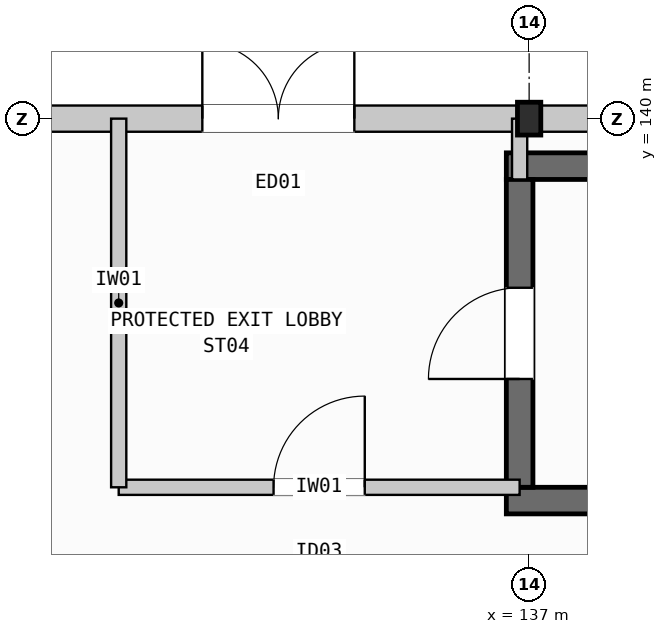
"""IFC4 building model, lengths in metres.
Left out: names, types, materials, properties, quantities, classifications, styles, units other than length and angle.
Written with IfcOpenShell. Run it as: python <this file> out.ifc"""

import sys

from ifc_helpers import new_model, si_unit, direction, frame, frame_2d, origin, origin_2d, place, context, subcontext, project, spatial, rectangle, i_section, extrude, element, fill, save


model = new_model("IFC4")
c1 = context("Model", 3, precision=1e-05, world=origin(), true_north=direction((0.0, 1.0)))
c2 = subcontext(c1, "Body", "Model", "MODEL_VIEW")
j1 = project(units=[si_unit("LENGTHUNIT", "METRE"), si_unit("PLANEANGLEUNIT", "RADIAN")], contexts=[c1])
p1 = place(None, origin())
s1 = spatial("IfcSite", under=j1, at=p1, CompositionType="ELEMENT")
p2 = place(p1, origin())
s2 = spatial("IfcBuilding", under=s1, at=p2, CompositionType="ELEMENT")
p3 = place(p2, origin())
s3 = spatial("IfcBuildingStorey", under=s2, at=p3, CompositionType="ELEMENT", Elevation=0.0)
p4 = place(p3, frame((137.0, 140.0, 0.0), z_axis=(0.0, 0.0, 1.0), x_axis=(1.0, 0.0, 0.0)))
e1 = element("IfcColumn", 1, at=p4, inside=s3, PredefinedType="COLUMN", context=c2, shape_type="SweptSolid", body=[
    extrude(i_section(OverallWidth=0.307, OverallDepth=0.432, WebThickness=0.021, FlangeThickness=0.04, FilletRadius=0.027, at=origin_2d()), origin(), (0.0, 0.0, 1.0), 6.0),
])
for number, where, z_axis, x_axis in (
    (2, (136.7, 134.975, 0.0), (0.0, 0.0, 1.0), (1.0, 0.0, 0.0)),
    (3, (136.7, 139.375, 0.0), (0.0, 0.0, 1.0), (1.0, 0.0, 0.0)),
):
    element("IfcWall", number, at=place(p3, frame(where, z_axis=z_axis, x_axis=x_axis)), inside=s3, PredefinedType="SHEAR", context=c2, shape_type="SweptSolid", body=[
        extrude(rectangle(XDim=9.1, YDim=0.35, at=frame_2d((4.55, 0.0))), origin(), (0.0, 0.0, 1.0), 6.0),
    ])
p5 = place(p3, frame((136.875, 135.15, 0.0), z_axis=(0.0, 0.0, 1.0), x_axis=(0.0, 1.0, 0.0)))
e4 = element("IfcWall", 4, at=p5, inside=s3, PredefinedType="SHEAR", context=c2, shape_type="SweptSolid", body=[
    extrude(rectangle(XDim=4.05, YDim=0.35, at=frame_2d((2.025, 0.0))), origin(), (0.0, 0.0, 1.0), 6.0),
])
p6 = place(p5, frame((1.425, 0.0, 0.0)))
e5 = element("IfcOpeningElement", 5, at=p6, cuts=e4, PredefinedType="OPENING", context=c2, shape_type="SweptSolid", body=[
    extrude(rectangle(XDim=1.2, YDim=2.2, at=frame_2d((0.6, 1.1))), frame((0.0, 0.185, 0.0), z_axis=(0.0, -1.0, 0.0), x_axis=(1.0, 0.0, 0.0)), (0.0, 0.0, 1.0), 0.37),
])
p7 = place(p3, frame((128.149, 140.0, 0.0), z_axis=(0.0, 0.0, 1.0), x_axis=(1.0, 0.0, 0.0)))
e6 = element("IfcWall", 6, at=p7, inside=s3, PredefinedType="STANDARD", context=c2, shape_type="SweptSolid", body=[
    extrude(rectangle(XDim=8.701, YDim=0.345, at=frame_2d((4.351, 0.0))), origin(), (0.0, 0.0, 1.0), 4.22),
])
p8 = place(p7, frame((4.551, 0.0, 0.0)))
e7 = element("IfcOpeningElement", 7, at=p8, cuts=e6, PredefinedType="OPENING", context=c2, shape_type="SweptSolid", body=[
    extrude(rectangle(XDim=2.0, YDim=2.3, at=frame_2d((1.0, 1.15))), frame((0.0, 0.183, 0.0), z_axis=(0.0, -1.0, 0.0), x_axis=(1.0, 0.0, 0.0)), (0.0, 0.0, 1.0), 0.365),
])
p9 = place(p3, frame((137.149, 140.0, 0.0), z_axis=(0.0, 0.0, 1.0), x_axis=(1.0, 0.0, 0.0)))
e8 = element("IfcWall", 8, at=p9, inside=s3, PredefinedType="STANDARD", context=c2, shape_type="SweptSolid", body=[
    extrude(rectangle(XDim=8.701, YDim=0.345, at=frame_2d((4.351, 0.0))), origin(), (0.0, 0.0, 1.0), 4.958),
])
p10 = place(p3, frame((131.6, 135.15, 0.0), z_axis=(0.0, 0.0, 1.0), x_axis=(1.0, 0.0, 0.0)))
e9 = element("IfcWall", 9, at=p10, inside=s3, PredefinedType="PARTITIONING", context=c2, shape_type="SweptSolid", body=[
    extrude(rectangle(XDim=5.275, YDim=0.2, at=frame_2d((2.637, 0.0))), origin(), (0.0, 0.0, 1.0), 4.2),
])
p11 = place(p10, frame((2.038, 0.0, 0.0)))
e10 = element("IfcOpeningElement", 10, at=p11, cuts=e9, PredefinedType="OPENING", context=c2, shape_type="SweptSolid", body=[
    extrude(rectangle(XDim=1.2, YDim=2.2, at=frame_2d((0.6, 1.1))), frame((0.0, 0.11, 0.0), z_axis=(0.0, -1.0, 0.0), x_axis=(1.0, 0.0, 0.0)), (0.0, 0.0, 1.0), 0.22),
])
p12 = place(p3, frame((131.6, 135.15, 0.0), z_axis=(0.0, 0.0, 1.0), x_axis=(0.0, 1.0, 0.0)))
e11 = element("IfcWall", 11, at=p12, inside=s3, PredefinedType="PARTITIONING", context=c2, shape_type="SweptSolid", body=[
    extrude(rectangle(XDim=4.85, YDim=0.2, at=frame_2d((2.425, 0.0))), origin(), (0.0, 0.0, 1.0), 4.2),
])
p13 = place(p3, frame((136.875, 139.2, 0.0), z_axis=(0.0, 0.0, 1.0), x_axis=(0.0, 1.0, 0.0)))
e12 = element("IfcWall", 12, at=p13, inside=s3, PredefinedType="PARTITIONING", context=c2, shape_type="SweptSolid", body=[
    extrude(rectangle(XDim=0.8, YDim=0.2, at=frame_2d((0.4, 0.0))), origin(), (0.0, 0.0, 1.0), 4.2),
])
p14 = place(p6, origin())
e13 = element("IfcDoor", 13, at=p14, inside=s3, OperationType="SINGLE_SWING_LEFT", PredefinedType="DOOR", context=c2, shape_type="SweptSolid", body=[
    extrude(rectangle(XDim=1.2, YDim=2.2, at=frame_2d((0.6, 1.1))), frame((0.0, 0.025, 0.0), z_axis=(0.0, -1.0, 0.0), x_axis=(1.0, 0.0, 0.0)), (0.0, 0.0, 1.0), 0.05),
])
fill(e5, e13)
p15 = place(p8, origin())
e14 = element("IfcDoor", 14, at=p15, inside=s3, OperationType="DOUBLE_DOOR_SINGLE_SWING", PredefinedType="DOOR", context=c2, shape_type="SweptSolid", body=[
    extrude(rectangle(XDim=2.0, YDim=2.3, at=frame_2d((1.0, 1.15))), frame((0.0, 0.025, 0.0), z_axis=(0.0, -1.0, 0.0), x_axis=(1.0, 0.0, 0.0)), (0.0, 0.0, 1.0), 0.05),
])
fill(e7, e14)
p16 = place(p11, origin())
e15 = element("IfcDoor", 15, at=p16, inside=s3, OperationType="SINGLE_SWING_RIGHT", PredefinedType="DOOR", context=c2, shape_type="SweptSolid", body=[
    extrude(rectangle(XDim=1.2, YDim=2.2, at=frame_2d((0.6, 1.1))), frame((0.0, 0.025, 0.0), z_axis=(0.0, -1.0, 0.0), x_axis=(1.0, 0.0, 0.0)), (0.0, 0.0, 1.0), 0.05),
])
fill(e10, e15)
save(model, sys.argv[1])
